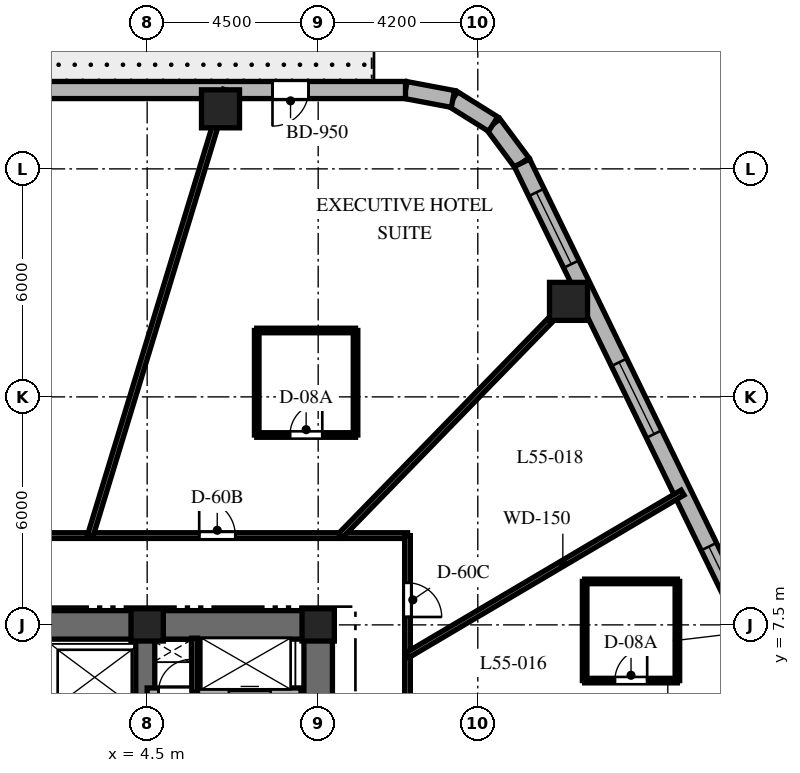
"""IFC4 building model, lengths in metres.
Left out: names, types, materials, properties, quantities, classifications, styles, units other than length and angle.
Written with IfcOpenShell. Run it as: python <this file> out.ifc"""

import sys

from ifc_helpers import new_model, si_unit, direction, frame, frame_2d, origin, origin_2d, place, context, subcontext, project, spatial, rectangle, extrude, element, fill, save


model = new_model("IFC4")
c1 = context("Model", 3, precision=1e-05, world=origin(), true_north=direction((0.0, 1.0)))
c2 = subcontext(c1, "Body", "Model", "MODEL_VIEW")
j1 = project(units=[si_unit("LENGTHUNIT", "METRE"), si_unit("PLANEANGLEUNIT", "RADIAN")], contexts=[c1])
p1 = place(None, origin())
s1 = spatial("IfcSite", under=j1, at=p1, CompositionType="ELEMENT")
p2 = place(p1, origin())
s2 = spatial("IfcBuilding", under=s1, at=p2, CompositionType="ELEMENT")
p3 = place(p2, frame((0.0, 0.0, 221.7)))
s3 = spatial("IfcBuildingStorey", under=s2, at=p3, CompositionType="ELEMENT", Elevation=221.7)
p4 = place(p3, frame((1.85, 7.5, 0.0), z_axis=(0.0, 0.0, 1.0), x_axis=(1.0, 0.0, 0.0)))
e1 = element("IfcWall", 1, at=p4, inside=s3, PredefinedType="SHEAR", context=c2, shape_type="SweptSolid", body=[
    extrude(rectangle(XDim=7.525, YDim=0.75, at=frame_2d((3.762, 0.0))), origin(), (0.0, 0.0, 1.0), 3.8),
])
p5 = place(p3, frame((9.0, -7.125, 0.0), z_axis=(0.0, 0.0, 1.0), x_axis=(0.0, 1.0, 0.0)))
e2 = element("IfcWall", 2, at=p5, inside=s3, PredefinedType="SHEAR", context=c2, shape_type="SweptSolid", body=[
    extrude(rectangle(XDim=14.25, YDim=0.75, at=frame_2d((7.125, 0.0))), origin(), (0.0, 0.0, 1.0), 3.8),
])
p6 = place(p5, frame((10.25, 0.0, 0.0)))
e3 = element("IfcOpeningElement", 3, at=p6, cuts=e2, PredefinedType="OPENING", context=c2, shape_type="SweptSolid", body=[
    extrude(rectangle(XDim=1.05, YDim=2.15, at=frame_2d((0.525, 1.075))), frame((0.0, 0.385, 0.0), z_axis=(0.0, -1.0, 0.0), x_axis=(1.0, 0.0, 0.0)), (0.0, 0.0, 1.0), 0.77),
])
p7 = place(p3, frame((4.45, 2.25, 0.0), z_axis=(0.0, 0.0, 1.0), x_axis=(0.0, 1.0, 0.0)))
e4 = element("IfcWall", 4, at=p7, inside=s3, PredefinedType="SHEAR", context=c2, shape_type="SweptSolid", body=[
    extrude(rectangle(XDim=4.875, YDim=0.5, at=frame_2d((2.438, 0.0))), origin(), (0.0, 0.0, 1.0), 3.8),
])
for number, where, z_axis, x_axis in (
    (5, (9.0, 7.5, 0.0), (0.0, 0.0, 1.0), (1.0, 0.0, 0.0)),
    (6, (4.5, 7.5, 0.0), (0.0, 0.0, 1.0), (1.0, 0.0, 0.0)),
):
    element("IfcColumn", number, at=place(p3, frame(where, z_axis=z_axis, x_axis=x_axis)), inside=s3, PredefinedType="COLUMN", context=c2, shape_type="SweptSolid", body=[
        extrude(rectangle(XDim=0.85, YDim=0.85, at=origin_2d()), origin(), (0.0, 0.0, 1.0), 3.8),
    ])
for number, where, z_axis, x_axis in (
    (7, (15.587, 16.013, 0.0), (0.0, 0.0, 1.0), (1.0, 0.0, 0.0)),
    (8, (6.43, 21.08, 0.0), (0.0, 0.0, 1.0), (1.0, 0.0, 0.0)),
):
    element("IfcColumn", number, at=place(p3, frame(where, z_axis=z_axis, x_axis=x_axis)), inside=s3, PredefinedType="COLUMN", context=c2, shape_type="SweptSolid", body=[
        extrude(rectangle(XDim=1.0, YDim=1.0, at=origin_2d()), origin(), (0.0, 0.0, 1.0), 3.8),
    ])
p8 = place(p3, frame((14.362, 19.658, 0.0), z_axis=(0.0, 0.0, 1.0), x_axis=(-0.596642462792, 0.80250717853, 0.0)))
e9 = element("IfcWall", 9, at=p8, inside=s3, PredefinedType="SOLIDWALL", context=c2, shape_type="SweptSolid", body=[
    extrude(rectangle(XDim=1.27, YDim=0.45, at=frame_2d((0.635, 0.0))), origin(), (0.0, 0.0, 1.0), 3.5),
])
p9 = place(p3, frame((13.604, 20.678, 0.0), z_axis=(0.0, 0.0, 1.0), x_axis=(-0.847910404124, 0.53013955387, 0.0)))
e10 = element("IfcWall", 10, at=p9, inside=s3, PredefinedType="SOLIDWALL", context=c2, shape_type="SweptSolid", body=[
    extrude(rectangle(XDim=1.249, YDim=0.45, at=frame_2d((0.624, 0.0))), origin(), (0.0, 0.0, 1.0), 3.5),
])
p10 = place(p3, frame((12.546, 21.34, 0.0), z_axis=(0.0, 0.0, 1.0), x_axis=(-0.982686750835, 0.18527479519, 0.0)))
e11 = element("IfcWall", 11, at=p10, inside=s3, PredefinedType="SOLIDWALL", context=c2, shape_type="SweptSolid", body=[
    extrude(rectangle(XDim=1.27, YDim=0.45, at=frame_2d((0.635, 0.0))), origin(), (0.0, 0.0, 1.0), 3.5),
])
p11 = place(p3, frame((22.74, 2.452, 0.0), z_axis=(0.0, 0.0, 1.0), x_axis=(-0.437753424814, 0.899095066755, 0.0)))
e12 = element("IfcWall", 12, at=p11, inside=s3, PredefinedType="SOLIDWALL", context=c2, shape_type="SweptSolid", body=[
    extrude(rectangle(XDim=19.137, YDim=0.45, at=frame_2d((9.569, 0.0))), origin(), (0.0, 0.0, 1.0), 3.5),
])
p12 = place(p11, frame((5.805, 0.0, 0.8)))
e13 = element("IfcOpeningElement", 13, at=p12, cuts=e12, PredefinedType="OPENING", context=c2, shape_type="SweptSolid", body=[
    extrude(rectangle(XDim=2.1, YDim=1.85, at=frame_2d((1.05, 0.925))), frame((0.0, 0.235, 0.0), z_axis=(0.0, -1.0, 0.0), x_axis=(1.0, 0.0, 0.0)), (0.0, 0.0, 1.0), 0.47),
])
p13 = place(p11, frame((11.199, 0.0, 0.8)))
e14 = element("IfcOpeningElement", 14, at=p13, cuts=e12, PredefinedType="OPENING", context=c2, shape_type="SweptSolid", body=[
    extrude(rectangle(XDim=2.1, YDim=1.85, at=frame_2d((1.05, 0.925))), frame((0.0, 0.235, 0.0), z_axis=(0.0, -1.0, 0.0), x_axis=(1.0, 0.0, 0.0)), (0.0, 0.0, 1.0), 0.47),
])
p14 = place(p11, frame((16.173, 0.0, 0.8)))
e15 = element("IfcOpeningElement", 15, at=p14, cuts=e12, PredefinedType="OPENING", context=c2, shape_type="SweptSolid", body=[
    extrude(rectangle(XDim=2.1, YDim=1.85, at=frame_2d((1.05, 0.925))), frame((0.0, 0.235, 0.0), z_axis=(0.0, -1.0, 0.0), x_axis=(1.0, 0.0, 0.0)), (0.0, 0.0, 1.0), 0.47),
])
p15 = place(p11, frame((0.916, 0.0, 0.8)))
e16 = element("IfcOpeningElement", 16, at=p15, cuts=e12, PredefinedType="OPENING", context=c2, shape_type="SweptSolid", body=[
    extrude(rectangle(XDim=2.1, YDim=1.85, at=frame_2d((1.05, 0.925))), frame((0.0, 0.235, 0.0), z_axis=(0.0, -1.0, 0.0), x_axis=(1.0, 0.0, 0.0)), (0.0, 0.0, 1.0), 0.47),
])
p16 = place(p3, frame((11.298, 21.575, 0.0), z_axis=(0.0, 0.0, 1.0), x_axis=(-1.0, 0.0, 0.0)))
e17 = element("IfcWall", 17, at=p16, inside=s3, PredefinedType="SOLIDWALL", context=c2, shape_type="SweptSolid", body=[
    extrude(rectangle(XDim=24.399, YDim=0.45, at=frame_2d((12.2, 0.0))), origin(), (0.0, 0.0, 1.0), 3.5),
])
p17 = place(p16, frame((2.55, 0.0, 0.0)))
e18 = element("IfcOpeningElement", 18, at=p17, cuts=e17, PredefinedType="OPENING", context=c2, shape_type="SweptSolid", body=[
    extrude(rectangle(XDim=0.95, YDim=2.15, at=frame_2d((0.475, 1.075))), frame((0.0, 0.235, 0.0), z_axis=(0.0, -1.0, 0.0), x_axis=(1.0, 0.0, 0.0)), (0.0, 0.0, 1.0), 0.47),
])
p18 = place(p16, frame((11.451, 0.0, 0.8)))
e19 = element("IfcOpeningElement", 19, at=p18, cuts=e17, PredefinedType="OPENING", context=c2, shape_type="SweptSolid", body=[
    extrude(rectangle(XDim=1.5, YDim=1.8, at=frame_2d((0.75, 0.9))), frame((0.0, 0.235, 0.0), z_axis=(0.0, -1.0, 0.0), x_axis=(1.0, 0.0, 0.0)), (0.0, 0.0, 1.0), 0.47),
])
p19 = place(p16, frame((21.296, 0.0, 0.8)))
e20 = element("IfcOpeningElement", 20, at=p19, cuts=e17, PredefinedType="OPENING", context=c2, shape_type="SweptSolid", body=[
    extrude(rectangle(XDim=1.5, YDim=1.8, at=frame_2d((0.75, 0.9))), frame((0.0, 0.235, 0.0), z_axis=(0.0, -1.0, 0.0), x_axis=(1.0, 0.0, 0.0)), (0.0, 0.0, 1.0), 0.47),
])
p20 = place(p3, frame((4.5, 5.74, 0.0), z_axis=(0.0, 0.0, 1.0), x_axis=(1.0, 0.0, 0.0)))
e21 = element("IfcWall", 21, at=p20, inside=s3, PredefinedType="PARTITIONING", context=c2, shape_type="SweptSolid", body=[
    extrude(rectangle(XDim=4.05, YDim=0.2, at=frame_2d((2.025, 0.0))), origin(), (0.0, 0.0, 1.0), 3.5),
])
p21 = place(p20, frame((0.3, 0.0, 0.0)))
e22 = element("IfcOpeningElement", 22, at=p21, cuts=e21, PredefinedType="OPENING", context=c2, shape_type="SweptSolid", body=[
    extrude(rectangle(XDim=0.85, YDim=2.03, at=frame_2d((0.425, 1.015))), frame((0.0, 0.11, 0.0), z_axis=(0.0, -1.0, 0.0), x_axis=(1.0, 0.0, 0.0)), (0.0, 0.0, 1.0), 0.22),
])
p22 = place(p20, frame((2.15, 0.0, 0.0)))
e23 = element("IfcOpeningElement", 23, at=p22, cuts=e21, PredefinedType="OPENING", context=c2, shape_type="SweptSolid", body=[
    extrude(rectangle(XDim=1.1, YDim=2.2, at=frame_2d((0.55, 1.1))), frame((0.0, 0.11, 0.0), z_axis=(0.0, -1.0, 0.0), x_axis=(1.0, 0.0, 0.0)), (0.0, 0.0, 1.0), 0.22),
])
p23 = place(p3, frame((5.75, 5.74, 0.0), z_axis=(0.0, 0.0, 1.0), x_axis=(0.0, 1.0, 0.0)))
e24 = element("IfcWall", 24, at=p23, inside=s3, PredefinedType="PARTITIONING", context=c2, shape_type="SweptSolid", body=[
    extrude(rectangle(XDim=1.41, YDim=0.15, at=frame_2d((0.705, 0.0))), origin(), (0.0, 0.0, 1.0), 3.5),
])
p24 = place(p3, frame((0.92, 9.85, 0.0), z_axis=(0.0, 0.0, 1.0), x_axis=(1.0, 0.0, 0.0)))
e25 = element("IfcWall", 25, at=p24, inside=s3, PredefinedType="PARTITIONING", context=c2, shape_type="SweptSolid", body=[
    extrude(rectangle(XDim=10.43, YDim=0.15, at=frame_2d((5.215, 0.0))), origin(), (0.0, 0.0, 1.0), 2.99),
])
p25 = place(p24, frame((4.949, 0.0, 0.0)))
e26 = element("IfcOpeningElement", 26, at=p25, cuts=e25, PredefinedType="OPENING", context=c2, shape_type="SweptSolid", body=[
    extrude(rectangle(XDim=0.95, YDim=2.03, at=frame_2d((0.475, 1.015))), frame((0.0, 0.085, 0.0), z_axis=(0.0, -1.0, 0.0), x_axis=(1.0, 0.0, 0.0)), (0.0, 0.0, 1.0), 0.17),
])
p26 = place(p3, frame((11.35, 9.85, 0.0), z_axis=(0.0, 0.0, 1.0), x_axis=(0.0, -1.0, 0.0)))
e27 = element("IfcWall", 27, at=p26, inside=s3, PredefinedType="PARTITIONING", context=c2, shape_type="SweptSolid", body=[
    extrude(rectangle(XDim=12.4, YDim=0.15, at=frame_2d((6.2, 0.0))), origin(), (0.0, 0.0, 1.0), 2.99),
])
p27 = place(p26, frame((4.443, 0.0, 0.0)))
e28 = element("IfcOpeningElement", 28, at=p27, cuts=e27, PredefinedType="OPENING", context=c2, shape_type="SweptSolid", body=[
    extrude(rectangle(XDim=0.95, YDim=2.03, at=frame_2d((0.475, 1.015))), frame((0.0, 0.085, 0.0), z_axis=(0.0, -1.0, 0.0), x_axis=(1.0, 0.0, 0.0)), (0.0, 0.0, 1.0), 0.17),
])
p28 = place(p26, frame((1.242, 0.0, 0.0)))
e29 = element("IfcOpeningElement", 29, at=p28, cuts=e27, PredefinedType="OPENING", context=c2, shape_type="SweptSolid", body=[
    extrude(rectangle(XDim=0.9, YDim=2.03, at=frame_2d((0.45, 1.015))), frame((0.0, 0.085, 0.0), z_axis=(0.0, -1.0, 0.0), x_axis=(1.0, 0.0, 0.0)), (0.0, 0.0, 1.0), 0.17),
])
p29 = place(p26, frame((8.835, 0.0, 0.0)))
e30 = element("IfcOpeningElement", 30, at=p29, cuts=e27, PredefinedType="OPENING", context=c2, shape_type="SweptSolid", body=[
    extrude(rectangle(XDim=0.95, YDim=2.03, at=frame_2d((0.475, 1.015))), frame((0.0, 0.085, 0.0), z_axis=(0.0, -1.0, 0.0), x_axis=(1.0, 0.0, 0.0)), (0.0, 0.0, 1.0), 0.17),
])
p30 = place(p3, frame((11.35, 3.121, 0.0), z_axis=(0.0, 0.0, 1.0), x_axis=(0.964212793822, 0.265129568758, 0.0)))
e31 = element("IfcWall", 31, at=p30, inside=s3, PredefinedType="PARTITIONING", context=c2, shape_type="SweptSolid", body=[
    extrude(rectangle(XDim=10.12, YDim=0.15, at=frame_2d((5.06, 0.0))), origin(), (0.0, 0.0, 1.0), 2.74),
])
p31 = place(p3, frame((11.35, 6.705, 0.0), z_axis=(0.0, 0.0, 1.0), x_axis=(0.86097625004, 0.508645158108, 0.0)))
e32 = element("IfcWall", 32, at=p31, inside=s3, PredefinedType="PARTITIONING", context=c2, shape_type="SweptSolid", body=[
    extrude(rectangle(XDim=8.406, YDim=0.15, at=frame_2d((4.203, 0.0))), origin(), (0.0, 0.0, 1.0), 2.74),
])
p32 = place(p3, frame((9.588, 9.85, 0.0), z_axis=(0.0, 0.0, 1.0), x_axis=(0.697519469595, 0.716565830567, 0.0)))
e33 = element("IfcWall", 33, at=p32, inside=s3, PredefinedType="PARTITIONING", context=c2, shape_type="SweptSolid", body=[
    extrude(rectangle(XDim=9.126, YDim=0.15, at=frame_2d((4.563, 0.0))), origin(), (0.0, 0.0, 1.0), 2.74),
])
p33 = place(p3, frame((3.004, 9.85, 0.0), z_axis=(0.0, 0.0, 1.0), x_axis=(0.291775760688, 0.956486751333, 0.0)))
e34 = element("IfcWall", 34, at=p33, inside=s3, PredefinedType="PARTITIONING", context=c2, shape_type="SweptSolid", body=[
    extrude(rectangle(XDim=12.258, YDim=0.15, at=frame_2d((6.129, 0.0))), origin(), (0.0, 0.0, 1.0), 2.74),
])
p34 = place(p3, frame((16.012, 6.034, 0.0), z_axis=(0.0, 0.0, 1.0), x_axis=(1.0, 0.0, 0.0)))
e35 = element("IfcWall", 35, at=p34, inside=s3, PredefinedType="PARTITIONING", context=c2, shape_type="SweptSolid", body=[
    extrude(rectangle(XDim=2.44, YDim=0.12, at=frame_2d((1.22, 0.0))), origin(), (0.0, 0.0, 1.0), 2.94),
])
p35 = place(p34, frame((0.795, 0.0, 0.0)))
e36 = element("IfcOpeningElement", 36, at=p35, cuts=e35, PredefinedType="OPENING", context=c2, shape_type="SweptSolid", body=[
    extrude(rectangle(XDim=0.85, YDim=2.03, at=frame_2d((0.425, 1.015))), frame((0.0, 0.07, 0.0), z_axis=(0.0, -1.0, 0.0), x_axis=(1.0, 0.0, 0.0)), (0.0, 0.0, 1.0), 0.14),
])
p36 = place(p3, frame((18.452, 6.034, 0.0), z_axis=(0.0, 0.0, 1.0), x_axis=(0.0, 1.0, 0.0)))
e37 = element("IfcWall", 37, at=p36, inside=s3, PredefinedType="PARTITIONING", context=c2, shape_type="SweptSolid", body=[
    extrude(rectangle(XDim=2.61, YDim=0.12, at=frame_2d((1.305, 0.0))), origin(), (0.0, 0.0, 1.0), 2.99),
])
p37 = place(p3, frame((18.452, 8.644, 0.0), z_axis=(0.0, 0.0, 1.0), x_axis=(-1.0, 0.0, 0.0)))
e38 = element("IfcWall", 38, at=p37, inside=s3, PredefinedType="PARTITIONING", context=c2, shape_type="SweptSolid", body=[
    extrude(rectangle(XDim=2.44, YDim=0.12, at=frame_2d((1.22, 0.0))), origin(), (0.0, 0.0, 1.0), 3.5),
])
p38 = place(p3, frame((16.012, 8.644, 0.0), z_axis=(0.0, 0.0, 1.0), x_axis=(0.0, -1.0, 0.0)))
e39 = element("IfcWall", 39, at=p38, inside=s3, PredefinedType="PARTITIONING", context=c2, shape_type="SweptSolid", body=[
    extrude(rectangle(XDim=2.61, YDim=0.12, at=frame_2d((1.305, 0.0))), origin(), (0.0, 0.0, 1.0), 2.99),
])
p39 = place(p3, frame((7.383, 12.497, 0.0), z_axis=(0.0, 0.0, 1.0), x_axis=(1.0, 0.0, 0.0)))
e40 = element("IfcWall", 40, at=p39, inside=s3, PredefinedType="PARTITIONING", context=c2, shape_type="SweptSolid", body=[
    extrude(rectangle(XDim=2.6, YDim=0.12, at=frame_2d((1.3, 0.0))), origin(), (0.0, 0.0, 1.0), 2.94),
])
p40 = place(p39, frame((0.875, 0.0, 0.0)))
e41 = element("IfcOpeningElement", 41, at=p40, cuts=e40, PredefinedType="OPENING", context=c2, shape_type="SweptSolid", body=[
    extrude(rectangle(XDim=0.85, YDim=2.03, at=frame_2d((0.425, 1.015))), frame((0.0, 0.07, 0.0), z_axis=(0.0, -1.0, 0.0), x_axis=(1.0, 0.0, 0.0)), (0.0, 0.0, 1.0), 0.14),
])
p41 = place(p3, frame((9.983, 12.497, 0.0), z_axis=(0.0, 0.0, 1.0), x_axis=(0.0, 1.0, 0.0)))
e42 = element("IfcWall", 42, at=p41, inside=s3, PredefinedType="PARTITIONING", context=c2, shape_type="SweptSolid", body=[
    extrude(rectangle(XDim=2.75, YDim=0.12, at=frame_2d((1.375, 0.0))), origin(), (0.0, 0.0, 1.0), 3.073),
])
p42 = place(p3, frame((9.983, 15.247, 0.0), z_axis=(0.0, 0.0, 1.0), x_axis=(-1.0, 0.0, 0.0)))
e43 = element("IfcWall", 43, at=p42, inside=s3, PredefinedType="PARTITIONING", context=c2, shape_type="SweptSolid", body=[
    extrude(rectangle(XDim=2.6, YDim=0.12, at=frame_2d((1.3, 0.0))), origin(), (0.0, 0.0, 1.0), 3.073),
])
p43 = place(p3, frame((7.383, 15.247, 0.0), z_axis=(0.0, 0.0, 1.0), x_axis=(0.0, -1.0, 0.0)))
e44 = element("IfcWall", 44, at=p43, inside=s3, PredefinedType="PARTITIONING", context=c2, shape_type="SweptSolid", body=[
    extrude(rectangle(XDim=2.75, YDim=0.12, at=frame_2d((1.375, 0.0))), origin(), (0.0, 0.0, 1.0), 2.94),
])
p44 = place(p12, origin())
e45 = element("IfcWindow", 45, at=p44, inside=s3, PartitioningType="SINGLE_PANEL", PredefinedType="WINDOW", context=c2, shape_type="SweptSolid", body=[
    extrude(rectangle(XDim=2.1, YDim=1.85, at=frame_2d((1.05, 0.925))), frame((0.0, 0.03, 0.0), z_axis=(0.0, -1.0, 0.0), x_axis=(1.0, 0.0, 0.0)), (0.0, 0.0, 1.0), 0.06),
])
fill(e13, e45)
p45 = place(p13, origin())
e46 = element("IfcWindow", 46, at=p45, inside=s3, PartitioningType="SINGLE_PANEL", PredefinedType="WINDOW", context=c2, shape_type="SweptSolid", body=[
    extrude(rectangle(XDim=2.1, YDim=1.85, at=frame_2d((1.05, 0.925))), frame((0.0, 0.03, 0.0), z_axis=(0.0, -1.0, 0.0), x_axis=(1.0, 0.0, 0.0)), (0.0, 0.0, 1.0), 0.06),
])
fill(e14, e46)
p46 = place(p14, origin())
e47 = element("IfcWindow", 47, at=p46, inside=s3, PartitioningType="SINGLE_PANEL", PredefinedType="WINDOW", context=c2, shape_type="SweptSolid", body=[
    extrude(rectangle(XDim=2.1, YDim=1.85, at=frame_2d((1.05, 0.925))), frame((0.0, 0.03, 0.0), z_axis=(0.0, -1.0, 0.0), x_axis=(1.0, 0.0, 0.0)), (0.0, 0.0, 1.0), 0.06),
])
fill(e15, e47)
p47 = place(p17, origin())
e48 = element("IfcDoor", 48, at=p47, inside=s3, OperationType="SINGLE_SWING_RIGHT", PredefinedType="DOOR", context=c2, shape_type="SweptSolid", body=[
    extrude(rectangle(XDim=0.95, YDim=2.15, at=frame_2d((0.475, 1.075))), frame((0.0, 0.025, 0.0), z_axis=(0.0, -1.0, 0.0), x_axis=(1.0, 0.0, 0.0)), (0.0, 0.0, 1.0), 0.05),
])
fill(e18, e48)
p48 = place(p21, origin())
e49 = element("IfcDoor", 49, at=p48, inside=s3, OperationType="SINGLE_SWING_RIGHT", PredefinedType="DOOR", context=c2, shape_type="SweptSolid", body=[
    extrude(rectangle(XDim=0.85, YDim=2.03, at=frame_2d((0.425, 1.015))), frame((0.0, 0.025, 0.0), z_axis=(0.0, -1.0, 0.0), x_axis=(1.0, 0.0, 0.0)), (0.0, 0.0, 1.0), 0.05),
])
fill(e22, e49)
p49 = place(p22, origin())
e50 = element("IfcDoor", 50, at=p49, inside=s3, OperationType="SLIDING_TO_RIGHT", PredefinedType="DOOR", context=c2, shape_type="SweptSolid", body=[
    extrude(rectangle(XDim=1.1, YDim=2.2, at=frame_2d((0.55, 1.1))), frame((0.0, 0.025, 0.0), z_axis=(0.0, -1.0, 0.0), x_axis=(1.0, 0.0, 0.0)), (0.0, 0.0, 1.0), 0.05),
])
fill(e23, e50)
p50 = place(p35, origin())
e51 = element("IfcDoor", 51, at=p50, inside=s3, OperationType="SINGLE_SWING_RIGHT", PredefinedType="DOOR", context=c2, shape_type="SweptSolid", body=[
    extrude(rectangle(XDim=0.85, YDim=2.03, at=frame_2d((0.425, 1.015))), frame((0.0, 0.025, 0.0), z_axis=(0.0, -1.0, 0.0), x_axis=(1.0, 0.0, 0.0)), (0.0, 0.0, 1.0), 0.05),
])
fill(e36, e51)
p51 = place(p28, origin())
e52 = element("IfcDoor", 52, at=p51, inside=s3, OperationType="SINGLE_SWING_RIGHT", PredefinedType="DOOR", context=c2, shape_type="SweptSolid", body=[
    extrude(rectangle(XDim=0.9, YDim=2.03, at=frame_2d((0.45, 1.015))), frame((0.0, 0.025, 0.0), z_axis=(0.0, -1.0, 0.0), x_axis=(1.0, 0.0, 0.0)), (0.0, 0.0, 1.0), 0.05),
])
fill(e29, e52)
p52 = place(p25, origin())
e53 = element("IfcDoor", 53, at=p52, inside=s3, OperationType="SINGLE_SWING_LEFT", PredefinedType="DOOR", context=c2, shape_type="SweptSolid", body=[
    extrude(rectangle(XDim=0.95, YDim=2.03, at=frame_2d((0.475, 1.015))), frame((0.0, 0.025, 0.0), z_axis=(0.0, -1.0, 0.0), x_axis=(1.0, 0.0, 0.0)), (0.0, 0.0, 1.0), 0.05),
])
fill(e26, e53)
p53 = place(p40, origin())
e54 = element("IfcDoor", 54, at=p53, inside=s3, OperationType="SINGLE_SWING_RIGHT", PredefinedType="DOOR", context=c2, shape_type="SweptSolid", body=[
    extrude(rectangle(XDim=0.85, YDim=2.03, at=frame_2d((0.425, 1.015))), frame((0.0, 0.025, 0.0), z_axis=(0.0, -1.0, 0.0), x_axis=(1.0, 0.0, 0.0)), (0.0, 0.0, 1.0), 0.05),
])
fill(e41, e54)
save(model, sys.argv[1])
